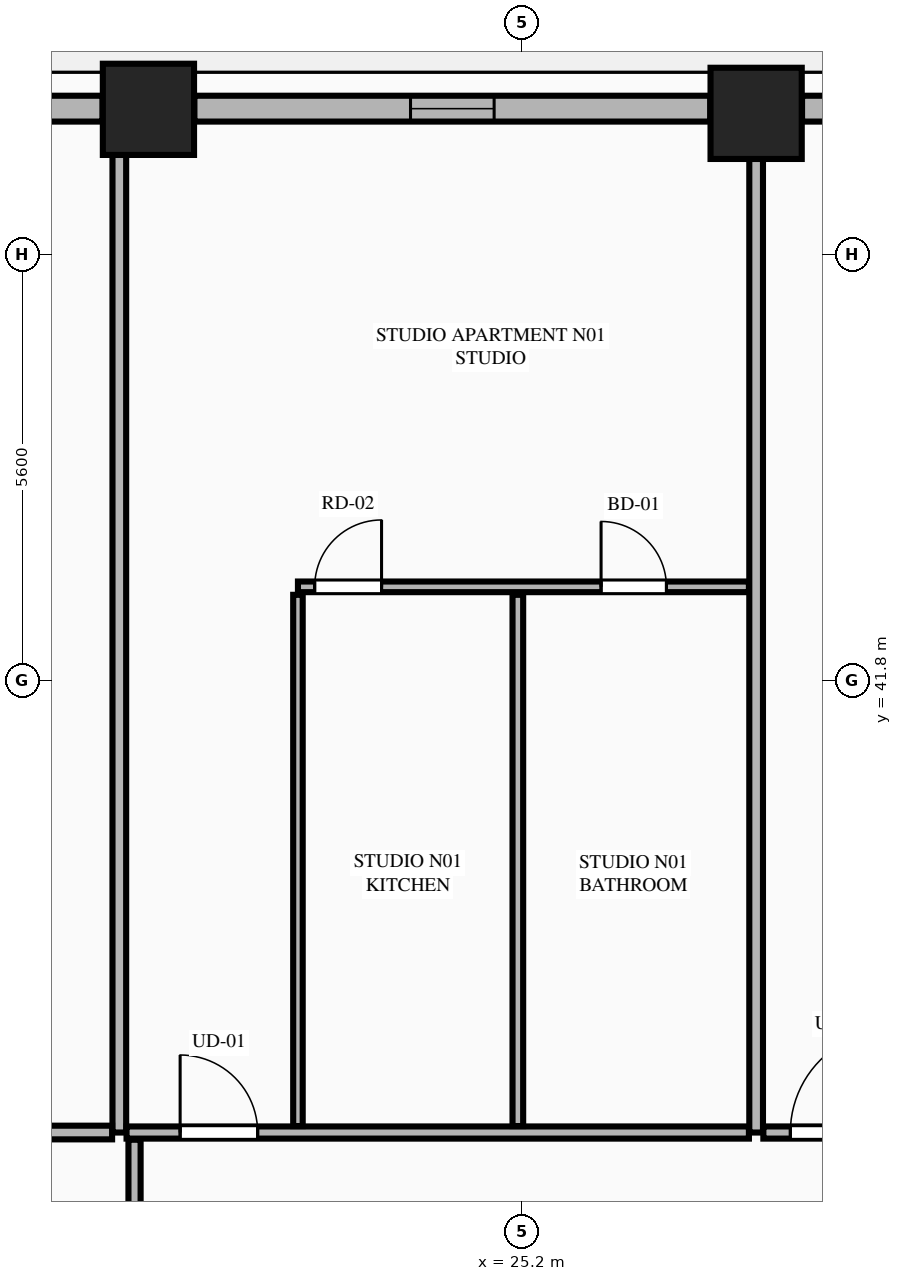
"""IFC4 building model, lengths in metres.
Left out: names, types, materials, properties, quantities, classifications, styles, units other than length and angle.
Written with IfcOpenShell. Run it as: python <this file> out.ifc"""

import sys

from ifc_helpers import new_model, si_unit, direction, frame, frame_2d, origin, origin_2d, place, context, subcontext, project, spatial, rectangle, extrude, element, fill, save


model = new_model("IFC4")
c1 = context("Model", 3, precision=1e-05, world=origin(), true_north=direction((0.0, 1.0)))
c2 = subcontext(c1, "Body", "Model", "MODEL_VIEW")
j1 = project(units=[si_unit("LENGTHUNIT", "METRE"), si_unit("PLANEANGLEUNIT", "RADIAN")], contexts=[c1])
p1 = place(None, origin())
s1 = spatial("IfcSite", under=j1, at=p1, CompositionType="ELEMENT")
p2 = place(p1, origin())
s2 = spatial("IfcBuilding", under=s1, at=p2, CompositionType="ELEMENT")
p3 = place(p2, frame((0.0, 0.0, 63.95)))
s3 = spatial("IfcBuildingStorey", under=s2, at=p3, CompositionType="ELEMENT", Elevation=63.95)
for number, where, z_axis, x_axis in (
    (1, (28.278, 49.258, 0.0), (0.0, 0.0, 1.0), (1.0, 0.0, 0.0)),
    (2, (20.283, 49.311, 0.0), (0.0, 0.0, 1.0), (1.0, 0.0, 0.0)),
):
    element("IfcColumn", number, at=place(p3, frame(where, z_axis=z_axis, x_axis=x_axis)), inside=s3, PredefinedType="COLUMN", context=c2, shape_type="SweptSolid", body=[
        extrude(rectangle(XDim=1.2, YDim=1.2, at=origin_2d()), origin(), (0.0, 0.0, 1.0), 3.55),
    ])
p4 = place(p3, frame((35.918, 49.32, 0.0), z_axis=(0.0, 0.0, 1.0), x_axis=(-1.0, 0.0, 0.0)))
e3 = element("IfcWall", 3, at=p4, inside=s3, PredefinedType="STANDARD", context=c2, shape_type="SweptSolid", body=[
    extrude(rectangle(XDim=7.036, YDim=0.34, at=frame_2d((3.518, 0.0))), origin(), (0.0, 0.0, 1.0), 2.787),
])
p5 = place(p4, frame((3.539, 0.0, 0.0)))
e4 = element("IfcOpeningElement", 4, at=p5, cuts=e3, PredefinedType="OPENING", context=c2, shape_type="SweptSolid", body=[
    extrude(rectangle(XDim=1.1, YDim=2.25, at=frame_2d((0.55, 1.125))), frame((0.0, 0.18, 0.0), z_axis=(0.0, -1.0, 0.0), x_axis=(1.0, 0.0, 0.0)), (0.0, 0.0, 1.0), 0.36),
])
p6 = place(p3, frame((27.674, 49.32, 0.0), z_axis=(0.0, 0.0, 1.0), x_axis=(-1.0, 0.0, 0.0)))
e5 = element("IfcWall", 5, at=p6, inside=s3, PredefinedType="STANDARD", context=c2, shape_type="SweptSolid", body=[
    extrude(rectangle(XDim=6.787, YDim=0.34, at=frame_2d((3.394, 0.0))), origin(), (0.0, 0.0, 1.0), 2.787),
])
p7 = place(p6, frame((2.843, 0.0, 0.75)))
e6 = element("IfcOpeningElement", 6, at=p7, cuts=e5, PredefinedType="OPENING", context=c2, shape_type="SweptSolid", body=[
    extrude(rectangle(XDim=1.1, YDim=1.887, at=frame_2d((0.55, 0.943))), frame((0.0, 0.18, 0.0), z_axis=(0.0, -1.0, 0.0), x_axis=(1.0, 0.0, 0.0)), (0.0, 0.0, 1.0), 0.36),
])
p8 = place(p3, frame((19.679, 49.32, 0.0), z_axis=(0.0, 0.0, 1.0), x_axis=(-1.0, 0.0, 0.0)))
e7 = element("IfcWall", 7, at=p8, inside=s3, PredefinedType="STANDARD", context=c2, shape_type="SweptSolid", body=[
    extrude(rectangle(XDim=1.245, YDim=0.34, at=frame_2d((0.623, 0.0))), origin(), (0.0, 0.0, 1.0), 3.33),
])
p9 = place(p3, frame((19.9, 35.85, 0.0), z_axis=(0.0, 0.0, 1.0), x_axis=(0.0, 1.0, 0.0)))
e8 = element("IfcWall", 8, at=p9, inside=s3, PredefinedType="PARTITIONING", context=c2, shape_type="SweptSolid", body=[
    extrude(rectangle(XDim=13.295, YDim=0.18, at=frame_2d((6.647, 0.0))), origin(), (0.0, 0.0, 1.0), 3.33),
])
p10 = place(p3, frame((28.278, 35.85, 0.0), z_axis=(0.0, 0.0, 1.0), x_axis=(0.0, 1.0, 0.0)))
e9 = element("IfcWall", 9, at=p10, inside=s3, PredefinedType="PARTITIONING", context=c2, shape_type="SweptSolid", body=[
    extrude(rectangle(XDim=13.295, YDim=0.18, at=frame_2d((6.647, 0.0))), origin(), (0.0, 0.0, 1.0), 2.7),
])
p11 = place(p3, frame((19.995, 35.85, 0.0), z_axis=(0.0, 0.0, 1.0), x_axis=(1.0, 0.0, 0.0)))
e10 = element("IfcWall", 10, at=p11, inside=s3, PredefinedType="PARTITIONING", context=c2, shape_type="SweptSolid", body=[
    extrude(rectangle(XDim=8.188, YDim=0.16, at=frame_2d((4.094, 0.0))), origin(), (0.0, 0.0, 1.0), 3.33),
])
p12 = place(p11, frame((0.705, 0.0, 0.0)))
e11 = element("IfcOpeningElement", 11, at=p12, cuts=e10, PredefinedType="OPENING", context=c2, shape_type="SweptSolid", body=[
    extrude(rectangle(XDim=1.02, YDim=2.25, at=frame_2d((0.51, 1.125))), frame((0.0, 0.09, 0.0), z_axis=(0.0, -1.0, 0.0), x_axis=(1.0, 0.0, 0.0)), (0.0, 0.0, 1.0), 0.18),
])
p13 = place(p3, frame((22.25, 35.935, 0.0), z_axis=(0.0, 0.0, 1.0), x_axis=(0.0, 1.0, 0.0)))
e12 = element("IfcWall", 12, at=p13, inside=s3, PredefinedType="PARTITIONING", context=c2, shape_type="SweptSolid", body=[
    extrude(rectangle(XDim=6.989, YDim=0.125, at=frame_2d((3.495, 0.0))), origin(), (0.0, 0.0, 1.0), 2.7),
])
p14 = place(p3, frame((22.25, 43.029, 0.0), z_axis=(0.0, 0.0, 1.0), x_axis=(1.0, 0.0, 0.0)))
e13 = element("IfcWall", 13, at=p14, inside=s3, PredefinedType="PLUMBINGWALL", context=c2, shape_type="SweptSolid", body=[
    extrude(rectangle(XDim=5.933, YDim=0.14, at=frame_2d((2.967, 0.0))), origin(), (0.0, 0.0, 1.0), 3.33),
])
p15 = place(p14, frame((3.988, 0.0, 0.0)))
e14 = element("IfcOpeningElement", 14, at=p15, cuts=e13, PredefinedType="OPENING", context=c2, shape_type="SweptSolid", body=[
    extrude(rectangle(XDim=0.86, YDim=2.1, at=frame_2d((0.43, 1.05))), frame((0.0, 0.08, 0.0), z_axis=(0.0, -1.0, 0.0), x_axis=(1.0, 0.0, 0.0)), (0.0, 0.0, 1.0), 0.16),
])
p16 = place(p14, frame((0.22, 0.0, 0.0)))
e15 = element("IfcOpeningElement", 15, at=p16, cuts=e13, PredefinedType="OPENING", context=c2, shape_type="SweptSolid", body=[
    extrude(rectangle(XDim=0.88, YDim=2.15, at=frame_2d((0.44, 1.075))), frame((0.0, 0.08, 0.0), z_axis=(0.0, -1.0, 0.0), x_axis=(1.0, 0.0, 0.0)), (0.0, 0.0, 1.0), 0.16),
])
p17 = place(p3, frame((25.143, 35.935, 0.0), z_axis=(0.0, 0.0, 1.0), x_axis=(0.0, 1.0, 0.0)))
e16 = element("IfcWall", 16, at=p17, inside=s3, PredefinedType="PLUMBINGWALL", context=c2, shape_type="SweptSolid", body=[
    extrude(rectangle(XDim=6.989, YDim=0.14, at=frame_2d((3.495, 0.0))), origin(), (0.0, 0.0, 1.0), 3.33),
])
p18 = place(p3, frame((28.373, 35.85, 0.0), z_axis=(0.0, 0.0, 1.0), x_axis=(1.0, 0.0, 0.0)))
e17 = element("IfcWall", 17, at=p18, inside=s3, PredefinedType="PARTITIONING", context=c2, shape_type="SweptSolid", body=[
    extrude(rectangle(XDim=16.432, YDim=0.16, at=frame_2d((8.216, 0.0))), origin(), (0.0, 0.0, 1.0), 3.33),
])
p19 = place(p18, frame((0.355, 0.0, 0.0)))
e18 = element("IfcOpeningElement", 18, at=p19, cuts=e17, PredefinedType="OPENING", context=c2, shape_type="SweptSolid", body=[
    extrude(rectangle(XDim=1.35, YDim=2.35, at=frame_2d((0.675, 1.175))), frame((0.0, 0.09, 0.0), z_axis=(0.0, -1.0, 0.0), x_axis=(1.0, 0.0, 0.0)), (0.0, 0.0, 1.0), 0.18),
])
p20 = place(p3, frame((10.665, 35.85, 0.0), z_axis=(0.0, 0.0, 1.0), x_axis=(1.0, 0.0, 0.0)))
e19 = element("IfcWall", 19, at=p20, inside=s3, PredefinedType="PARTITIONING", context=c2, shape_type="SweptSolid", body=[
    extrude(rectangle(XDim=9.14, YDim=0.18, at=frame_2d((4.57, 0.0))), origin(), (0.0, 0.0, 1.0), 3.33),
])
p21 = place(p3, frame((20.1, 16.045, 0.0), z_axis=(0.0, 0.0, 1.0), x_axis=(0.0, 1.0, 0.0)))
e20 = element("IfcWall", 20, at=p21, inside=s3, PredefinedType="PARTITIONING", context=c2, shape_type="SweptSolid", body=[
    extrude(rectangle(XDim=19.71, YDim=0.16, at=frame_2d((9.855, 0.0))), origin(), (0.0, 0.0, 1.0), 2.7),
])
p22 = place(p21, frame((0.4, 0.0, 0.0)))
e21 = element("IfcOpeningElement", 21, at=p22, cuts=e20, PredefinedType="OPENING", context=c2, shape_type="SweptSolid", body=[
    extrude(rectangle(XDim=1.02, YDim=2.25, at=frame_2d((0.51, 1.125))), frame((0.0, 0.09, 0.0), z_axis=(0.0, -1.0, 0.0), x_axis=(1.0, 0.0, 0.0)), (0.0, 0.0, 1.0), 0.18),
])
p23 = place(p7, origin())
e22 = element("IfcWindow", 22, at=p23, inside=s3, PartitioningType="SINGLE_PANEL", PredefinedType="WINDOW", context=c2, shape_type="SweptSolid", body=[
    extrude(rectangle(XDim=1.1, YDim=1.887, at=frame_2d((0.55, 0.943))), frame((0.0, 0.03, 0.0), z_axis=(0.0, -1.0, 0.0), x_axis=(1.0, 0.0, 0.0)), (0.0, 0.0, 1.0), 0.06),
])
fill(e6, e22)
p24 = place(p15, origin())
e23 = element("IfcDoor", 23, at=p24, inside=s3, OperationType="SINGLE_SWING_LEFT", PredefinedType="DOOR", context=c2, shape_type="SweptSolid", body=[
    extrude(rectangle(XDim=0.86, YDim=2.1, at=frame_2d((0.43, 1.05))), frame((0.0, 0.025, 0.0), z_axis=(0.0, -1.0, 0.0), x_axis=(1.0, 0.0, 0.0)), (0.0, 0.0, 1.0), 0.05),
])
fill(e14, e23)
p25 = place(p12, origin())
e24 = element("IfcDoor", 24, at=p25, inside=s3, OperationType="SINGLE_SWING_LEFT", PredefinedType="DOOR", context=c2, shape_type="SweptSolid", body=[
    extrude(rectangle(XDim=1.02, YDim=2.25, at=frame_2d((0.51, 1.125))), frame((0.0, 0.025, 0.0), z_axis=(0.0, -1.0, 0.0), x_axis=(1.0, 0.0, 0.0)), (0.0, 0.0, 1.0), 0.05),
])
fill(e11, e24)
p26 = place(p16, origin())
e25 = element("IfcDoor", 25, at=p26, inside=s3, OperationType="SINGLE_SWING_RIGHT", PredefinedType="DOOR", context=c2, shape_type="SweptSolid", body=[
    extrude(rectangle(XDim=0.88, YDim=2.15, at=frame_2d((0.44, 1.075))), frame((0.0, 0.025, 0.0), z_axis=(0.0, -1.0, 0.0), x_axis=(1.0, 0.0, 0.0)), (0.0, 0.0, 1.0), 0.05),
])
fill(e15, e25)
p27 = place(p19, origin())
e26 = element("IfcDoor", 26, at=p27, inside=s3, OperationType="SINGLE_SWING_RIGHT", PredefinedType="DOOR", context=c2, shape_type="SweptSolid", body=[
    extrude(rectangle(XDim=1.35, YDim=2.35, at=frame_2d((0.675, 1.175))), frame((0.0, 0.025, 0.0), z_axis=(0.0, -1.0, 0.0), x_axis=(1.0, 0.0, 0.0)), (0.0, 0.0, 1.0), 0.05),
])
fill(e18, e26)
save(model, sys.argv[1])
